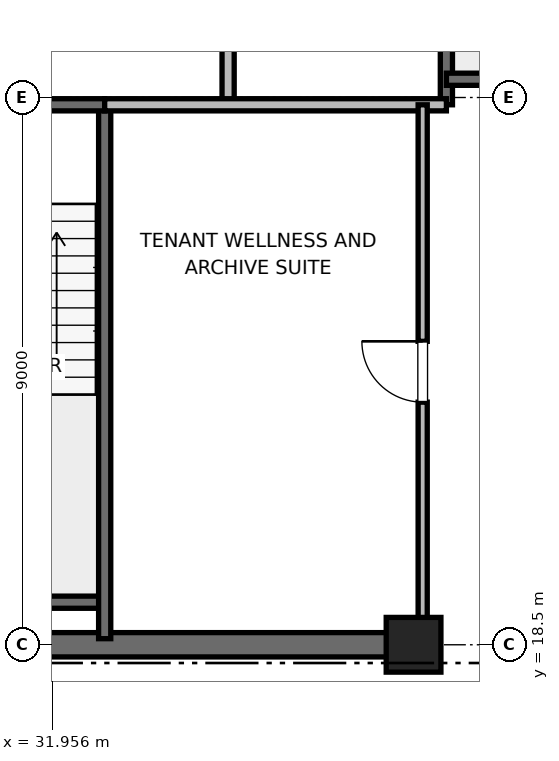
"""IFC4 building model, lengths in metres.
Left out: names, types, materials, properties, quantities, classifications, styles, units other than length and angle.
Written with IfcOpenShell. Run it as: python <this file> out.ifc"""

import sys

from ifc_helpers import new_model, si_unit, direction, frame, frame_2d, origin, origin_2d, place, context, subcontext, project, spatial, rectangle, extrude, element, fill, save


model = new_model("IFC4")
c1 = context("Model", 3, precision=1e-05, world=origin(), true_north=direction((0.0, 1.0)))
c2 = subcontext(c1, "Body", "Model", "MODEL_VIEW")
j1 = project(units=[si_unit("LENGTHUNIT", "METRE"), si_unit("PLANEANGLEUNIT", "RADIAN")], contexts=[c1])
p1 = place(None, origin())
s1 = spatial("IfcSite", under=j1, at=p1, CompositionType="ELEMENT")
p2 = place(p1, origin())
s2 = spatial("IfcBuilding", under=s1, at=p2, CompositionType="ELEMENT")
p3 = place(p2, frame((0.0, 0.0, 322.8)))
s3 = spatial("IfcBuildingStorey", under=s2, at=p3, CompositionType="ELEMENT", Elevation=322.8)
p4 = place(p3, frame((37.9, 18.5, 0.0), z_axis=(0.0, 0.0, 1.0), x_axis=(1.0, 0.0, 0.0)))
e1 = element("IfcColumn", 1, at=p4, inside=s3, PredefinedType="PILASTER", context=c2, shape_type="SweptSolid", body=[
    extrude(rectangle(XDim=0.9, YDim=0.9, at=origin_2d()), origin(), (0.0, 0.0, 1.0), 4.0),
])
p5 = place(p3, frame((29.0, 18.5, 0.0), z_axis=(0.0, 0.0, 1.0), x_axis=(1.0, 0.0, 0.0)))
e2 = element("IfcWall", 2, at=p5, inside=s3, PredefinedType="SHEAR", context=c2, shape_type="SweptSolid", body=[
    extrude(rectangle(XDim=9.2, YDim=0.4, at=frame_2d((4.6, 0.0))), origin(), (0.0, 0.0, 1.0), 3.785),
])
p6 = place(p3, frame((29.7, 19.2, 0.0), z_axis=(0.0, 0.0, 1.0), x_axis=(1.0, 0.0, 0.0)))
e3 = element("IfcWall", 3, at=p6, inside=s3, PredefinedType="SOLIDWALL", context=c2, shape_type="SweptSolid", body=[
    extrude(rectangle(XDim=3.12, YDim=0.2, at=frame_2d((1.56, 0.0))), origin(), (0.0, 0.0, 1.0), 3.785),
])
p7 = place(p3, frame((32.82, 18.6, 0.0), z_axis=(0.0, 0.0, 1.0), x_axis=(0.0, 1.0, 0.0)))
e4 = element("IfcWall", 4, at=p7, inside=s3, PredefinedType="SOLIDWALL", context=c2, shape_type="SweptSolid", body=[
    extrude(rectangle(XDim=8.78, YDim=0.2, at=frame_2d((4.39, 0.0))), origin(), (0.0, 0.0, 1.0), 3.785),
])
p8 = place(p3, frame((29.7, 27.38, 0.0), z_axis=(0.0, 0.0, 1.0), x_axis=(1.0, 0.0, 0.0)))
e5 = element("IfcWall", 5, at=p8, inside=s3, PredefinedType="SOLIDWALL", context=c2, shape_type="SweptSolid", body=[
    extrude(rectangle(XDim=3.12, YDim=0.2, at=frame_2d((1.56, 0.0))), origin(), (0.0, 0.0, 1.0), 3.785),
])
p9 = place(p8, frame((1.01, 0.0, 0.0)))
e6 = element("IfcOpeningElement", 6, at=p9, cuts=e5, PredefinedType="OPENING", context=c2, shape_type="SweptSolid", body=[
    extrude(rectangle(XDim=1.1, YDim=2.15, at=frame_2d((0.55, 1.075))), frame((0.0, 0.1, 0.0), z_axis=(0.0, -1.0, 0.0), x_axis=(1.0, 0.0, 0.0)), (0.0, 0.0, 1.0), 0.2),
])
p10 = place(p3, frame((38.44, 27.38, 0.0), z_axis=(0.0, 0.0, 1.0), x_axis=(0.0, 1.0, 0.0)))
e7 = element("IfcWall", 7, at=p10, inside=s3, PredefinedType="SOLIDWALL", context=c2, shape_type="SweptSolid", body=[
    extrude(rectangle(XDim=8.87, YDim=0.2, at=frame_2d((4.435, 0.0))), origin(), (0.0, 0.0, 1.0), 3.785),
])
p11 = place(p3, frame((38.44, 27.8, 0.0), z_axis=(0.0, 0.0, 1.0), x_axis=(1.0, 0.0, 0.0)))
e8 = element("IfcWall", 8, at=p11, inside=s3, PredefinedType="SOLIDWALL", context=c2, shape_type="SweptSolid", body=[
    extrude(rectangle(XDim=3.32, YDim=0.2, at=frame_2d((1.66, 0.0))), origin(), (0.0, 0.0, 1.0), 3.785),
])
p12 = place(p3, frame((34.85, 27.38, 0.0), z_axis=(0.0, 0.0, 1.0), x_axis=(0.0, 1.0, 0.0)))
e9 = element("IfcWall", 9, at=p12, inside=s3, PredefinedType="PARTITIONING", context=c2, shape_type="SweptSolid", body=[
    extrude(rectangle(XDim=3.37, YDim=0.2, at=frame_2d((1.685, 0.0))), origin(), (0.0, 0.0, 1.0), 3.785),
])
p13 = place(p12, frame((1.11, 0.0, 0.0)))
e10 = element("IfcOpeningElement", 10, at=p13, cuts=e9, PredefinedType="OPENING", context=c2, shape_type="SweptSolid", body=[
    extrude(rectangle(XDim=1.15, YDim=2.2, at=frame_2d((0.575, 1.1))), frame((0.0, 0.1, 0.0), z_axis=(0.0, -1.0, 0.0), x_axis=(1.0, 0.0, 0.0)), (0.0, 0.0, 1.0), 0.2),
])
p14 = place(p3, frame((32.82, 27.38, 0.0), z_axis=(0.0, 0.0, 1.0), x_axis=(1.0, 0.0, 0.0)))
e11 = element("IfcWall", 11, at=p14, inside=s3, PredefinedType="PARTITIONING", context=c2, shape_type="SweptSolid", body=[
    extrude(rectangle(XDim=5.62, YDim=0.2, at=frame_2d((2.81, 0.0))), origin(), (0.0, 0.0, 1.0), 3.785),
])
p15 = place(p3, frame((38.05, 18.6, 0.0), z_axis=(0.0, 0.0, 1.0), x_axis=(0.0, 1.0, 0.0)))
e12 = element("IfcWall", 12, at=p15, inside=s3, PredefinedType="PARTITIONING", context=c2, shape_type="SweptSolid", body=[
    extrude(rectangle(XDim=8.78, YDim=0.15, at=frame_2d((4.39, 0.0))), origin(), (0.0, 0.0, 1.0), 2.85),
])
p16 = place(p15, frame((3.89, 0.0, 0.0)))
e13 = element("IfcOpeningElement", 13, at=p16, cuts=e12, PredefinedType="OPENING", context=c2, shape_type="SweptSolid", body=[
    extrude(rectangle(XDim=1.0, YDim=2.15, at=frame_2d((0.5, 1.075))), frame((0.0, 0.075, 0.0), z_axis=(0.0, -1.0, 0.0), x_axis=(1.0, 0.0, 0.0)), (0.0, 0.0, 1.0), 0.15),
])
p17 = place(p16, origin())
e14 = element("IfcDoor", 14, at=p17, inside=s3, OperationType="SINGLE_SWING_RIGHT", PredefinedType="DOOR", context=c2, shape_type="SweptSolid", body=[
    extrude(rectangle(XDim=1.0, YDim=2.15, at=frame_2d((0.5, 1.075))), frame((0.0, 0.025, 0.0), z_axis=(0.0, -1.0, 0.0), x_axis=(1.0, 0.0, 0.0)), (0.0, 0.0, 1.0), 0.05),
])
fill(e13, e14)
save(model, sys.argv[1])
